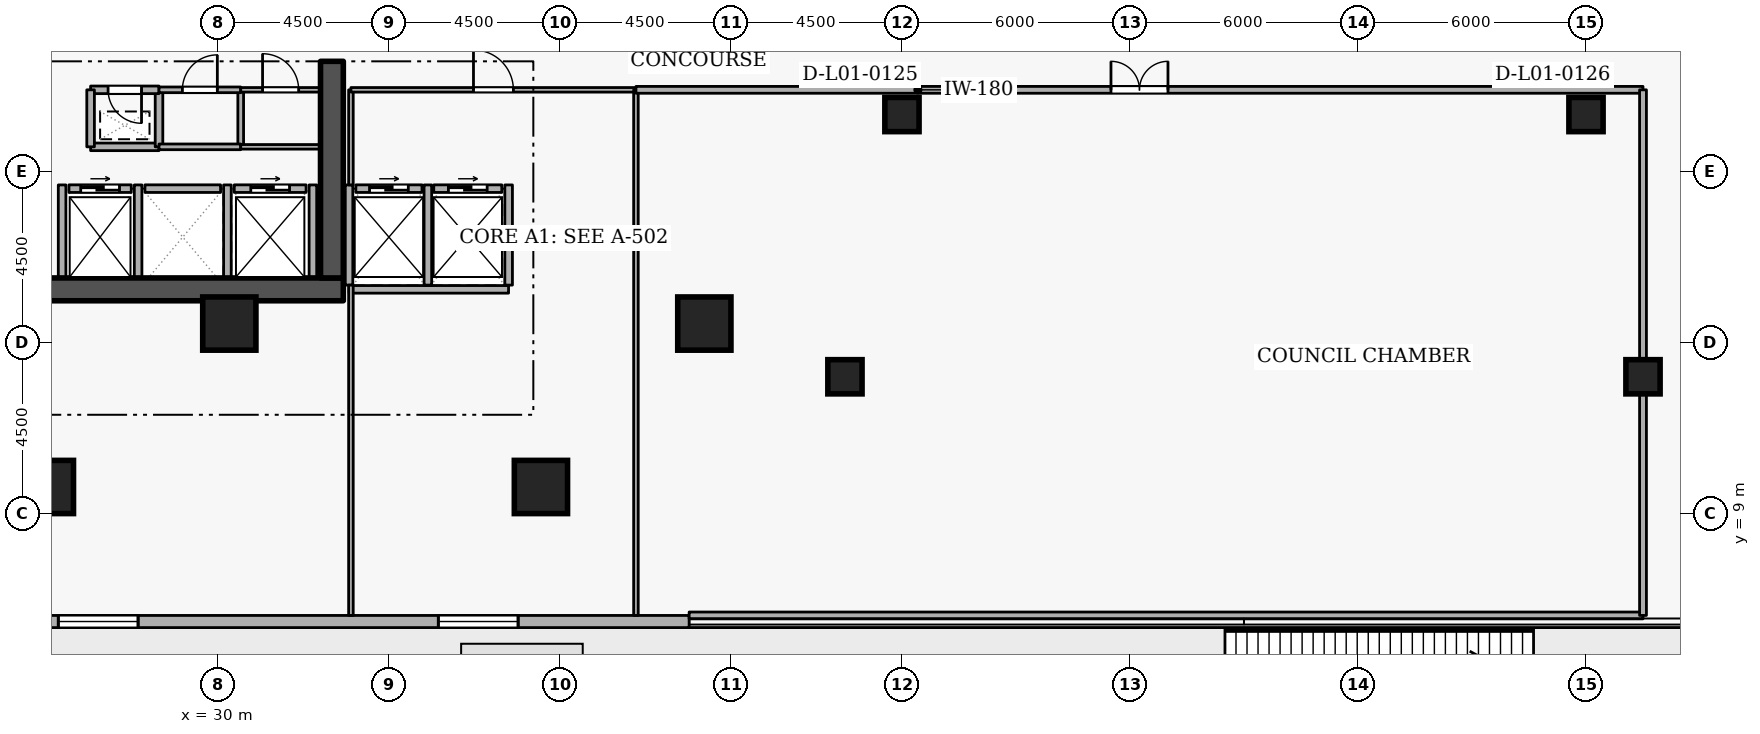
"""IFC4 building model, lengths in metres.
Left out: names, types, materials, properties, quantities, classifications, styles, units other than length and angle.
Written with IfcOpenShell. Run it as: python <this file> out.ifc"""

import sys

from ifc_helpers import new_model, si_unit, direction, frame, frame_2d, origin, origin_2d, place, context, subcontext, project, spatial, rectangle, extrude, element, fill, save


model = new_model("IFC4")
c1 = context("Model", 3, precision=1e-05, world=origin(), true_north=direction((0.0, 1.0)))
c2 = subcontext(c1, "Body", "Model", "MODEL_VIEW")
j1 = project(units=[si_unit("LENGTHUNIT", "METRE"), si_unit("PLANEANGLEUNIT", "RADIAN")], contexts=[c1])
p1 = place(None, origin())
s1 = spatial("IfcSite", under=j1, at=p1, CompositionType="ELEMENT")
p2 = place(p1, origin())
s2 = spatial("IfcBuilding", under=s1, at=p2, CompositionType="ELEMENT")
p3 = place(p2, frame((0.0, 0.0, 4.8)))
s3 = spatial("IfcBuildingStorey", under=s2, at=p3, CompositionType="ELEMENT", Elevation=4.8)
p4 = place(p3, frame((17.7, 14.9, 0.0), z_axis=(0.0, 0.0, 1.0), x_axis=(1.0, 0.0, 0.0)))
e1 = element("IfcWall", 1, at=p4, inside=s3, PredefinedType="SHEAR", context=c2, shape_type="SweptSolid", body=[
    extrude(rectangle(XDim=15.6, YDim=0.6, at=frame_2d((7.8, 0.0))), origin(), (0.0, 0.0, 1.0), 4.8),
])
p5 = place(p3, frame((33.0, 15.2, 0.0), z_axis=(0.0, 0.0, 1.0), x_axis=(0.0, 1.0, 0.0)))
e2 = element("IfcWall", 2, at=p5, inside=s3, PredefinedType="SHEAR", context=c2, shape_type="SweptSolid", body=[
    extrude(rectangle(XDim=5.7, YDim=0.6, at=frame_2d((2.85, 0.0))), origin(), (0.0, 0.0, 1.0), 4.8),
])
for number, where, z_axis, x_axis in (
    (3, (25.5, 9.7, 0.0), (0.0, 0.0, 1.0), (1.0, 0.0, 0.0)),
    (4, (38.5, 9.7, 0.0), (0.0, 0.0, 1.0), (1.0, 0.0, 0.0)),
    (5, (42.8, 14.0, 0.0), (0.0, 0.0, 1.0), (1.0, 0.0, 0.0)),
    (6, (30.3, 14.0, 0.0), (0.0, 0.0, 1.0), (1.0, 0.0, 0.0)),
):
    element("IfcColumn", number, at=place(p3, frame(where, z_axis=z_axis, x_axis=x_axis)), inside=s3, PredefinedType="COLUMN", context=c2, shape_type="SweptSolid", body=[
        extrude(rectangle(XDim=1.4, YDim=1.4, at=origin_2d()), origin(), (0.0, 0.0, 1.0), 4.8),
    ])
for number, where, z_axis, x_axis in (
    (7, (46.5, 12.6, 0.0), (0.0, 0.0, 1.0), (1.0, 0.0, 0.0)),
    (8, (67.5, 12.6, 0.0), (0.0, 0.0, 1.0), (1.0, 0.0, 0.0)),
    (9, (48.0, 19.5, 0.0), (0.0, 0.0, 1.0), (1.0, 0.0, 0.0)),
    (10, (66.0, 19.5, 0.0), (0.0, 0.0, 1.0), (1.0, 0.0, 0.0)),
):
    element("IfcColumn", number, at=place(p3, frame(where, z_axis=z_axis, x_axis=x_axis)), inside=s3, PredefinedType="COLUMN", context=c2, shape_type="SweptSolid", body=[
        extrude(rectangle(XDim=0.9, YDim=0.9, at=origin_2d()), origin(), (0.0, 0.0, 1.0), 4.8),
    ])
p6 = place(p3, frame((3.0, 6.16, 0.0), z_axis=(0.0, 0.0, 1.0), x_axis=(1.0, 0.0, 0.0)))
e11 = element("IfcWall", 11, at=p6, inside=s3, PredefinedType="STANDARD", context=c2, shape_type="SweptSolid", body=[
    extrude(rectangle(XDim=39.4, YDim=0.32, at=frame_2d((19.7, 0.0))), origin(), (0.0, 0.0, 1.0), 3.86),
])
p7 = place(p6, frame((6.2, 0.0, 0.0)))
e12 = element("IfcOpeningElement", 12, at=p7, cuts=e11, PredefinedType="OPENING", context=c2, shape_type="SweptSolid", body=[
    extrude(rectangle(XDim=1.15, YDim=2.1, at=frame_2d((0.575, 1.05))), frame((0.0, 0.17, 0.0), z_axis=(0.0, -1.0, 0.0), x_axis=(1.0, 0.0, 0.0)), (0.0, 0.0, 1.0), 0.34),
])
p8 = place(p6, frame((3.0, 0.0, 0.78)))
e13 = element("IfcOpeningElement", 13, at=p8, cuts=e11, PredefinedType="OPENING", context=c2, shape_type="SweptSolid", body=[
    extrude(rectangle(XDim=2.1, YDim=2.4, at=frame_2d((1.05, 1.2))), frame((0.0, 0.17, 0.0), z_axis=(0.0, -1.0, 0.0), x_axis=(1.0, 0.0, 0.0)), (0.0, 0.0, 1.0), 0.34),
])
p9 = place(p6, frame((12.8, 0.0, 0.78)))
e14 = element("IfcOpeningElement", 14, at=p9, cuts=e11, PredefinedType="OPENING", context=c2, shape_type="SweptSolid", body=[
    extrude(rectangle(XDim=2.1, YDim=2.4, at=frame_2d((1.05, 1.2))), frame((0.0, 0.17, 0.0), z_axis=(0.0, -1.0, 0.0), x_axis=(1.0, 0.0, 0.0)), (0.0, 0.0, 1.0), 0.34),
])
p10 = place(p6, frame((22.8, 0.0, 0.78)))
e15 = element("IfcOpeningElement", 15, at=p10, cuts=e11, PredefinedType="OPENING", context=c2, shape_type="SweptSolid", body=[
    extrude(rectangle(XDim=2.1, YDim=2.4, at=frame_2d((1.05, 1.2))), frame((0.0, 0.17, 0.0), z_axis=(0.0, -1.0, 0.0), x_axis=(1.0, 0.0, 0.0)), (0.0, 0.0, 1.0), 0.34),
])
p11 = place(p6, frame((32.8, 0.0, 0.78)))
e16 = element("IfcOpeningElement", 16, at=p11, cuts=e11, PredefinedType="OPENING", context=c2, shape_type="SweptSolid", body=[
    extrude(rectangle(XDim=2.1, YDim=2.4, at=frame_2d((1.05, 1.2))), frame((0.0, 0.17, 0.0), z_axis=(0.0, -1.0, 0.0), x_axis=(1.0, 0.0, 0.0)), (0.0, 0.0, 1.0), 0.34),
])
p12 = place(p3, frame((26.08, 17.55, 0.0), z_axis=(0.0, 0.0, 1.0), x_axis=(1.0, 0.0, 0.0)))
e17 = element("IfcWall", 17, at=p12, inside=s3, PredefinedType="STANDARD", context=c2, shape_type="SweptSolid", body=[
    extrude(rectangle(XDim=1.64, YDim=0.2, at=frame_2d((0.82, 0.0))), origin(), (0.0, 0.0, 1.0), 4.46),
])
p13 = place(p12, frame((0.31, 0.0, 0.0)))
e18 = element("IfcOpeningElement", 18, at=p13, cuts=e17, PredefinedType="OPENING", context=c2, shape_type="SweptSolid", body=[
    extrude(rectangle(XDim=1.02, YDim=2.06, at=frame_2d((0.51, 1.03))), frame((0.0, 0.11, 0.0), z_axis=(0.0, -1.0, 0.0), x_axis=(1.0, 0.0, 0.0)), (0.0, 0.0, 1.0), 0.22),
])
p14 = place(p3, frame((28.08, 17.55, 0.0), z_axis=(0.0, 0.0, 1.0), x_axis=(1.0, 0.0, 0.0)))
e19 = element("IfcWall", 19, at=p14, inside=s3, PredefinedType="STANDARD", context=c2, shape_type="SweptSolid", body=[
    extrude(rectangle(XDim=1.99, YDim=0.2, at=frame_2d((0.995, 0.0))), origin(), (0.0, 0.0, 1.0), 4.46),
])
p15 = place(p3, frame((30.43, 17.55, 0.0), z_axis=(0.0, 0.0, 1.0), x_axis=(1.0, 0.0, 0.0)))
e20 = element("IfcWall", 20, at=p15, inside=s3, PredefinedType="STANDARD", context=c2, shape_type="SweptSolid", body=[
    extrude(rectangle(XDim=1.89, YDim=0.2, at=frame_2d((0.945, 0.0))), origin(), (0.0, 0.0, 1.0), 4.46),
])
p16 = place(p15, frame((0.435, 0.0, 0.0)))
e21 = element("IfcOpeningElement", 21, at=p16, cuts=e20, PredefinedType="OPENING", context=c2, shape_type="SweptSolid", body=[
    extrude(rectangle(XDim=1.02, YDim=2.06, at=frame_2d((0.51, 1.03))), frame((0.0, 0.11, 0.0), z_axis=(0.0, -1.0, 0.0), x_axis=(1.0, 0.0, 0.0)), (0.0, 0.0, 1.0), 0.22),
])
p17 = place(p3, frame((33.63, 17.55, 0.0), z_axis=(0.0, 0.0, 1.0), x_axis=(1.0, 0.0, 0.0)))
e22 = element("IfcWall", 22, at=p17, inside=s3, PredefinedType="STANDARD", context=c2, shape_type="SweptSolid", body=[
    extrude(rectangle(XDim=1.74, YDim=0.2, at=frame_2d((0.87, 0.0))), origin(), (0.0, 0.0, 1.0), 4.46),
])
p18 = place(p17, frame((0.36, 0.0, 0.0)))
e23 = element("IfcOpeningElement", 23, at=p18, cuts=e22, PredefinedType="OPENING", context=c2, shape_type="SweptSolid", body=[
    extrude(rectangle(XDim=1.02, YDim=2.06, at=frame_2d((0.51, 1.03))), frame((0.0, 0.11, 0.0), z_axis=(0.0, -1.0, 0.0), x_axis=(1.0, 0.0, 0.0)), (0.0, 0.0, 1.0), 0.22),
])
p19 = place(p3, frame((35.68, 17.55, 0.0), z_axis=(0.0, 0.0, 1.0), x_axis=(1.0, 0.0, 0.0)))
e24 = element("IfcWall", 24, at=p19, inside=s3, PredefinedType="STANDARD", context=c2, shape_type="SweptSolid", body=[
    extrude(rectangle(XDim=1.79, YDim=0.2, at=frame_2d((0.895, 0.0))), origin(), (0.0, 0.0, 1.0), 4.46),
])
p20 = place(p19, frame((0.385, 0.0, 0.0)))
e25 = element("IfcOpeningElement", 25, at=p20, cuts=e24, PredefinedType="OPENING", context=c2, shape_type="SweptSolid", body=[
    extrude(rectangle(XDim=1.02, YDim=2.06, at=frame_2d((0.51, 1.03))), frame((0.0, 0.11, 0.0), z_axis=(0.0, -1.0, 0.0), x_axis=(1.0, 0.0, 0.0)), (0.0, 0.0, 1.0), 0.22),
])
for number, where, z_axis, x_axis in (
    (26, (27.9, 15.212, 0.0), (0.0, 0.0, 1.0), (0.0, 1.0, 0.0)),
    (27, (25.9, 15.212, 0.0), (0.0, 0.0, 1.0), (0.0, 1.0, 0.0)),
    (28, (30.25, 15.212, 0.0), (0.0, 0.0, 1.0), (0.0, 1.0, 0.0)),
    (29, (32.5, 15.212, 0.0), (0.0, 0.0, 1.0), (0.0, 1.0, 0.0)),
):
    element("IfcWall", number, at=place(p3, frame(where, z_axis=z_axis, x_axis=x_axis)), inside=s3, PredefinedType="STANDARD", context=c2, shape_type="SweptSolid", body=[
        extrude(rectangle(XDim=2.436, YDim=0.2, at=frame_2d((1.218, 0.0))), origin(), (0.0, 0.0, 1.0), 4.46),
    ])
p21 = place(p3, frame((33.452, 14.9, 0.0), z_axis=(0.0, 0.0, 1.0), x_axis=(1.0, 0.0, 0.0)))
e30 = element("IfcWall", 30, at=p21, inside=s3, PredefinedType="STANDARD", context=c2, shape_type="SweptSolid", body=[
    extrude(rectangle(XDim=4.196, YDim=0.2, at=frame_2d((2.098, 0.0))), origin(), (0.0, 0.0, 1.0), 4.46),
])
for number, where, z_axis, x_axis in (
    (31, (35.525, 15.012, 0.0), (0.0, 0.0, 1.0), (0.0, 1.0, 0.0)),
    (32, (33.45, 15.012, 0.0), (0.0, 0.0, 1.0), (0.0, 1.0, 0.0)),
    (33, (37.65, 15.012, 0.0), (0.0, 0.0, 1.0), (0.0, 1.0, 0.0)),
):
    element("IfcWall", number, at=place(p3, frame(where, z_axis=z_axis, x_axis=x_axis)), inside=s3, PredefinedType="STANDARD", context=c2, shape_type="SweptSolid", body=[
        extrude(rectangle(XDim=2.636, YDim=0.2, at=frame_2d((1.318, 0.0))), origin(), (0.0, 0.0, 1.0), 4.46),
    ])
p22 = place(p3, frame((26.65, 18.65, 0.0), z_axis=(0.0, 0.0, 1.0), x_axis=(1.0, 0.0, 0.0)))
e34 = element("IfcWall", 34, at=p22, inside=s3, PredefinedType="STANDARD", context=c2, shape_type="SweptSolid", body=[
    extrude(rectangle(XDim=1.8, YDim=0.2, at=frame_2d((0.9, 0.0))), origin(), (0.0, 0.0, 1.0), 4.46),
])
p23 = place(p3, frame((28.45, 18.65, 0.0), z_axis=(0.0, 0.0, 1.0), x_axis=(0.0, 1.0, 0.0)))
e35 = element("IfcWall", 35, at=p23, inside=s3, PredefinedType="STANDARD", context=c2, shape_type="SweptSolid", body=[
    extrude(rectangle(XDim=1.5, YDim=0.2, at=frame_2d((0.75, 0.0))), origin(), (0.0, 0.0, 1.0), 4.46),
])
p24 = place(p3, frame((28.45, 20.15, 0.0), z_axis=(0.0, 0.0, 1.0), x_axis=(-1.0, 0.0, 0.0)))
e36 = element("IfcWall", 36, at=p24, inside=s3, PredefinedType="STANDARD", context=c2, shape_type="SweptSolid", body=[
    extrude(rectangle(XDim=1.8, YDim=0.2, at=frame_2d((0.9, 0.0))), origin(), (0.0, 0.0, 1.0), 4.46),
])
p25 = place(p24, frame((0.46, 0.0, 0.0)))
e37 = element("IfcOpeningElement", 37, at=p25, cuts=e36, PredefinedType="OPENING", context=c2, shape_type="SweptSolid", body=[
    extrude(rectangle(XDim=0.88, YDim=2.04, at=frame_2d((0.44, 1.02))), frame((0.0, 0.11, 0.0), z_axis=(0.0, -1.0, 0.0), x_axis=(1.0, 0.0, 0.0)), (0.0, 0.0, 1.0), 0.22),
])
p26 = place(p3, frame((26.65, 20.15, 0.0), z_axis=(0.0, 0.0, 1.0), x_axis=(0.0, -1.0, 0.0)))
e38 = element("IfcWall", 38, at=p26, inside=s3, PredefinedType="STANDARD", context=c2, shape_type="SweptSolid", body=[
    extrude(rectangle(XDim=1.5, YDim=0.2, at=frame_2d((0.75, 0.0))), origin(), (0.0, 0.0, 1.0), 4.46),
])
p27 = place(p3, frame((30.6, 20.15, 0.0), z_axis=(0.0, 0.0, 1.0), x_axis=(0.0, -1.0, 0.0)))
e39 = element("IfcWall", 39, at=p27, inside=s3, PredefinedType="PARTITIONING", context=c2, shape_type="SweptSolid", body=[
    extrude(rectangle(XDim=1.5, YDim=0.15, at=frame_2d((0.75, 0.0))), origin(), (0.0, 0.0, 1.0), 4.46),
])
p28 = place(p3, frame((30.6, 18.65, 0.0), z_axis=(0.0, 0.0, 1.0), x_axis=(-1.0, 0.0, 0.0)))
e40 = element("IfcWall", 40, at=p28, inside=s3, PredefinedType="PARTITIONING", context=c2, shape_type="SweptSolid", body=[
    extrude(rectangle(XDim=2.15, YDim=0.15, at=frame_2d((1.075, 0.0))), origin(), (0.0, 0.0, 1.0), 4.46),
])
p29 = place(p3, frame((28.45, 20.15, 0.0), z_axis=(0.0, 0.0, 1.0), x_axis=(1.0, 0.0, 0.0)))
e41 = element("IfcWall", 41, at=p29, inside=s3, PredefinedType="PARTITIONING", context=c2, shape_type="SweptSolid", body=[
    extrude(rectangle(XDim=2.15, YDim=0.15, at=frame_2d((1.075, 0.0))), origin(), (0.0, 0.0, 1.0), 4.46),
])
p30 = place(p29, frame((0.615, 0.0, 0.0)))
e42 = element("IfcOpeningElement", 42, at=p30, cuts=e41, PredefinedType="OPENING", context=c2, shape_type="SweptSolid", body=[
    extrude(rectangle(XDim=0.92, YDim=2.08, at=frame_2d((0.46, 1.04))), frame((0.0, 0.085, 0.0), z_axis=(0.0, -1.0, 0.0), x_axis=(1.0, 0.0, 0.0)), (0.0, 0.0, 1.0), 0.17),
])
p31 = place(p3, frame((32.7, 18.65, 0.0), z_axis=(0.0, 0.0, 1.0), x_axis=(-1.0, 0.0, 0.0)))
e43 = element("IfcWall", 43, at=p31, inside=s3, PredefinedType="PARTITIONING", context=c2, shape_type="SweptSolid", body=[
    extrude(rectangle(XDim=2.1, YDim=0.12, at=frame_2d((1.05, 0.0))), origin(), (0.0, 0.0, 1.0), 4.46),
])
p32 = place(p3, frame((30.6, 20.15, 0.0), z_axis=(0.0, 0.0, 1.0), x_axis=(1.0, 0.0, 0.0)))
e44 = element("IfcWall", 44, at=p32, inside=s3, PredefinedType="PARTITIONING", context=c2, shape_type="SweptSolid", body=[
    extrude(rectangle(XDim=2.1, YDim=0.12, at=frame_2d((1.05, 0.0))), origin(), (0.0, 0.0, 1.0), 4.46),
])
p33 = place(p32, frame((0.575, 0.0, 0.0)))
e45 = element("IfcOpeningElement", 45, at=p33, cuts=e44, PredefinedType="OPENING", context=c2, shape_type="SweptSolid", body=[
    extrude(rectangle(XDim=0.95, YDim=2.1, at=frame_2d((0.475, 1.05))), frame((0.0, 0.07, 0.0), z_axis=(0.0, -1.0, 0.0), x_axis=(1.0, 0.0, 0.0)), (0.0, 0.0, 1.0), 0.14),
])
p34 = place(p3, frame((33.5, 6.32, 0.0), z_axis=(0.0, 0.0, 1.0), x_axis=(0.0, 1.0, 0.0)))
e46 = element("IfcWall", 46, at=p34, inside=s3, PredefinedType="PARTITIONING", context=c2, shape_type="SweptSolid", body=[
    extrude(rectangle(XDim=8.692, YDim=0.12, at=frame_2d((4.346, 0.0))), origin(), (0.0, 0.0, 1.0), 4.46),
])
p35 = place(p3, frame((33.5, 17.648, 0.0), z_axis=(0.0, 0.0, 1.0), x_axis=(0.0, 1.0, 0.0)))
e47 = element("IfcWall", 47, at=p35, inside=s3, PredefinedType="PARTITIONING", context=c2, shape_type="SweptSolid", body=[
    extrude(rectangle(XDim=2.502, YDim=0.12, at=frame_2d((1.251, 0.0))), origin(), (0.0, 0.0, 1.0), 4.46),
])
p36 = place(p3, frame((33.5, 20.15, 0.0), z_axis=(0.0, 0.0, 1.0), x_axis=(1.0, 0.0, 0.0)))
e48 = element("IfcWall", 48, at=p36, inside=s3, PredefinedType="PARTITIONING", context=c2, shape_type="SweptSolid", body=[
    extrude(rectangle(XDim=7.5, YDim=0.12, at=frame_2d((3.75, 0.0))), origin(), (0.0, 0.0, 1.0), 4.46),
])
p37 = place(p36, frame((3.225, 0.0, 0.0)))
e49 = element("IfcOpeningElement", 49, at=p37, cuts=e48, PredefinedType="OPENING", context=c2, shape_type="SweptSolid", body=[
    extrude(rectangle(XDim=1.05, YDim=2.1, at=frame_2d((0.525, 1.05))), frame((0.0, 0.07, 0.0), z_axis=(0.0, -1.0, 0.0), x_axis=(1.0, 0.0, 0.0)), (0.0, 0.0, 1.0), 0.14),
])
p38 = place(p3, frame((41.0, 20.15, 0.0), z_axis=(0.0, 0.0, 1.0), x_axis=(0.0, -1.0, 0.0)))
e50 = element("IfcWall", 50, at=p38, inside=s3, PredefinedType="PARTITIONING", context=c2, shape_type="SweptSolid", body=[
    extrude(rectangle(XDim=13.83, YDim=0.12, at=frame_2d((6.915, 0.0))), origin(), (0.0, 0.0, 1.0), 4.46),
])
p39 = place(p3, frame((67.5, 6.32, 0.0), z_axis=(0.0, 0.0, 1.0), x_axis=(-1.0, 0.0, 0.0)))
e51 = element("IfcWall", 51, at=p39, inside=s3, PredefinedType="PARTITIONING", context=c2, shape_type="SweptSolid", body=[
    extrude(rectangle(XDim=25.1, YDim=0.18, at=frame_2d((12.55, 0.0))), origin(), (0.0, 0.0, 1.0), 4.46),
])
p40 = place(p3, frame((41.0, 20.15, 0.0), z_axis=(0.0, 0.0, 1.0), x_axis=(1.0, 0.0, 0.0)))
e52 = element("IfcWall", 52, at=p40, inside=s3, PredefinedType="PARTITIONING", context=c2, shape_type="SweptSolid", body=[
    extrude(rectangle(XDim=26.5, YDim=0.18, at=frame_2d((13.25, 0.0))), origin(), (0.0, 0.0, 1.0), 4.46),
])
p41 = place(p40, frame((12.5, 0.0, 0.0)))
e53 = element("IfcOpeningElement", 53, at=p41, cuts=e52, PredefinedType="OPENING", context=c2, shape_type="SweptSolid", body=[
    extrude(rectangle(XDim=1.5, YDim=2.15, at=frame_2d((0.75, 1.075))), frame((0.0, 0.1, 0.0), z_axis=(0.0, -1.0, 0.0), x_axis=(1.0, 0.0, 0.0)), (0.0, 0.0, 1.0), 0.2),
])
p42 = place(p3, frame((67.5, 20.15, 0.0), z_axis=(0.0, 0.0, 1.0), x_axis=(0.0, -1.0, 0.0)))
e54 = element("IfcWall", 54, at=p42, inside=s3, PredefinedType="PARTITIONING", context=c2, shape_type="SweptSolid", body=[
    extrude(rectangle(XDim=13.83, YDim=0.18, at=frame_2d((6.915, 0.0))), origin(), (0.0, 0.0, 1.0), 4.46),
])
p43 = place(p10, origin())
e55 = element("IfcWindow", 55, at=p43, inside=s3, PartitioningType="SINGLE_PANEL", PredefinedType="WINDOW", context=c2, shape_type="SweptSolid", body=[
    extrude(rectangle(XDim=2.1, YDim=2.4, at=frame_2d((1.05, 1.2))), frame((0.0, 0.03, 0.0), z_axis=(0.0, -1.0, 0.0), x_axis=(1.0, 0.0, 0.0)), (0.0, 0.0, 1.0), 0.06),
])
fill(e15, e55)
p44 = place(p11, origin())
e56 = element("IfcWindow", 56, at=p44, inside=s3, PartitioningType="SINGLE_PANEL", PredefinedType="WINDOW", context=c2, shape_type="SweptSolid", body=[
    extrude(rectangle(XDim=2.1, YDim=2.4, at=frame_2d((1.05, 1.2))), frame((0.0, 0.03, 0.0), z_axis=(0.0, -1.0, 0.0), x_axis=(1.0, 0.0, 0.0)), (0.0, 0.0, 1.0), 0.06),
])
fill(e16, e56)
p45 = place(p13, origin())
e57 = element("IfcDoor", 57, at=p45, inside=s3, OperationType="SLIDING_TO_LEFT", PredefinedType="DOOR", context=c2, shape_type="SweptSolid", body=[
    extrude(rectangle(XDim=1.02, YDim=2.06, at=frame_2d((0.51, 1.03))), frame((0.0, 0.025, 0.0), z_axis=(0.0, -1.0, 0.0), x_axis=(1.0, 0.0, 0.0)), (0.0, 0.0, 1.0), 0.05),
])
fill(e18, e57)
p46 = place(p16, origin())
e58 = element("IfcDoor", 58, at=p46, inside=s3, OperationType="SLIDING_TO_LEFT", PredefinedType="DOOR", context=c2, shape_type="SweptSolid", body=[
    extrude(rectangle(XDim=1.02, YDim=2.06, at=frame_2d((0.51, 1.03))), frame((0.0, 0.025, 0.0), z_axis=(0.0, -1.0, 0.0), x_axis=(1.0, 0.0, 0.0)), (0.0, 0.0, 1.0), 0.05),
])
fill(e21, e58)
p47 = place(p18, origin())
e59 = element("IfcDoor", 59, at=p47, inside=s3, OperationType="SLIDING_TO_LEFT", PredefinedType="DOOR", context=c2, shape_type="SweptSolid", body=[
    extrude(rectangle(XDim=1.02, YDim=2.06, at=frame_2d((0.51, 1.03))), frame((0.0, 0.025, 0.0), z_axis=(0.0, -1.0, 0.0), x_axis=(1.0, 0.0, 0.0)), (0.0, 0.0, 1.0), 0.05),
])
fill(e23, e59)
p48 = place(p20, origin())
e60 = element("IfcDoor", 60, at=p48, inside=s3, OperationType="SLIDING_TO_LEFT", PredefinedType="DOOR", context=c2, shape_type="SweptSolid", body=[
    extrude(rectangle(XDim=1.02, YDim=2.06, at=frame_2d((0.51, 1.03))), frame((0.0, 0.025, 0.0), z_axis=(0.0, -1.0, 0.0), x_axis=(1.0, 0.0, 0.0)), (0.0, 0.0, 1.0), 0.05),
])
fill(e25, e60)
p49 = place(p25, origin())
e61 = element("IfcDoor", 61, at=p49, inside=s3, OperationType="SINGLE_SWING_LEFT", PredefinedType="DOOR", context=c2, shape_type="SweptSolid", body=[
    extrude(rectangle(XDim=0.88, YDim=2.04, at=frame_2d((0.44, 1.02))), frame((0.0, 0.025, 0.0), z_axis=(0.0, -1.0, 0.0), x_axis=(1.0, 0.0, 0.0)), (0.0, 0.0, 1.0), 0.05),
])
fill(e37, e61)
p50 = place(p30, origin())
e62 = element("IfcDoor", 62, at=p50, inside=s3, OperationType="SINGLE_SWING_RIGHT", PredefinedType="DOOR", context=c2, shape_type="SweptSolid", body=[
    extrude(rectangle(XDim=0.92, YDim=2.08, at=frame_2d((0.46, 1.04))), frame((0.0, 0.025, 0.0), z_axis=(0.0, -1.0, 0.0), x_axis=(1.0, 0.0, 0.0)), (0.0, 0.0, 1.0), 0.05),
])
fill(e42, e62)
p51 = place(p33, origin())
e63 = element("IfcDoor", 63, at=p51, inside=s3, OperationType="SINGLE_SWING_LEFT", PredefinedType="DOOR", context=c2, shape_type="SweptSolid", body=[
    extrude(rectangle(XDim=0.95, YDim=2.1, at=frame_2d((0.475, 1.05))), frame((0.0, 0.025, 0.0), z_axis=(0.0, -1.0, 0.0), x_axis=(1.0, 0.0, 0.0)), (0.0, 0.0, 1.0), 0.05),
])
fill(e45, e63)
p52 = place(p37, origin())
e64 = element("IfcDoor", 64, at=p52, inside=s3, OperationType="SINGLE_SWING_LEFT", PredefinedType="DOOR", context=c2, shape_type="SweptSolid", body=[
    extrude(rectangle(XDim=1.05, YDim=2.1, at=frame_2d((0.525, 1.05))), frame((0.0, 0.025, 0.0), z_axis=(0.0, -1.0, 0.0), x_axis=(1.0, 0.0, 0.0)), (0.0, 0.0, 1.0), 0.05),
])
fill(e49, e64)
p53 = place(p41, origin())
e65 = element("IfcDoor", 65, at=p53, inside=s3, OperationType="DOUBLE_DOOR_SINGLE_SWING", PredefinedType="DOOR", context=c2, shape_type="SweptSolid", body=[
    extrude(rectangle(XDim=1.5, YDim=2.15, at=frame_2d((0.75, 1.075))), frame((0.0, 0.025, 0.0), z_axis=(0.0, -1.0, 0.0), x_axis=(1.0, 0.0, 0.0)), (0.0, 0.0, 1.0), 0.05),
])
fill(e53, e65)
save(model, sys.argv[1])
